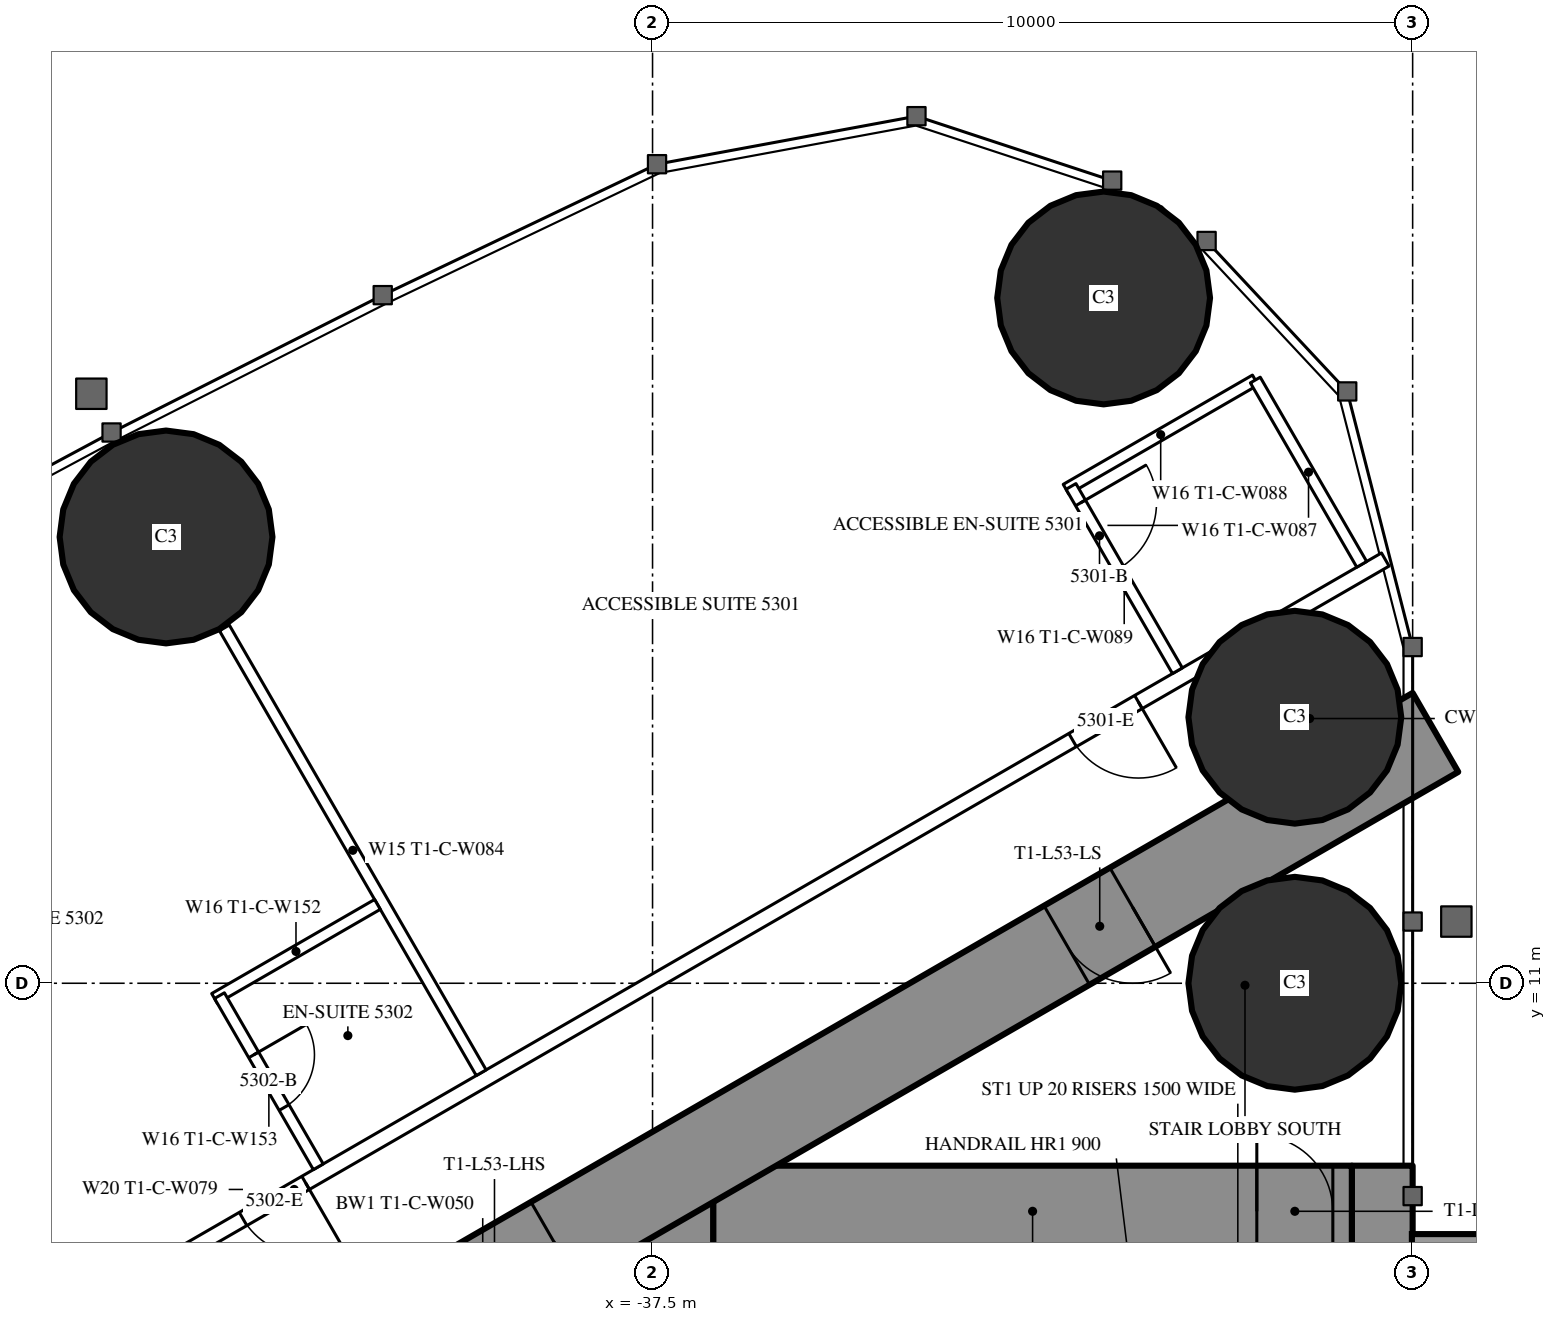
"""IFC4 building model, lengths in metres.
Left out: names, types, materials, properties, quantities, classifications, styles, units other than length and angle.
Written with IfcOpenShell. Run it as: python <this file> out.ifc"""

import sys

from ifc_helpers import new_model, si_unit, direction, frame, frame_2d, origin, origin_2d, place, context, subcontext, project, spatial, rectangle, circle, extrude, element, fill, save


model = new_model("IFC4")
c1 = context("Model", 3, precision=1e-05, world=origin(), true_north=direction((0.0, 1.0)))
c2 = subcontext(c1, "Body", "Model", "MODEL_VIEW")
j1 = project(units=[si_unit("LENGTHUNIT", "METRE"), si_unit("PLANEANGLEUNIT", "RADIAN")], contexts=[c1])
p1 = place(None, origin())
s1 = spatial("IfcSite", under=j1, at=p1, CompositionType="ELEMENT")
p2 = place(p1, origin())
s2 = spatial("IfcBuilding", under=s1, at=p2, CompositionType="ELEMENT")
p3 = place(p2, frame((0.0, 0.0, 198.3)))
s3 = spatial("IfcBuildingStorey", under=s2, at=p3, CompositionType="ELEMENT", Elevation=198.3)
for number, where, z_axis, x_axis in (
    (1, (-31.565, 20.016, 0.0), (0.0, 0.0, 1.0), (1.0, 0.0, 0.0)),
    (2, (-29.05, 11.0, 0.0), (0.0, 0.0, 1.0), (1.0, 0.0, 0.0)),
    (3, (-29.05, 14.5, 0.0), (0.0, 0.0, 1.0), (1.0, 0.0, 0.0)),
    (4, (-43.9, 16.871, 0.0), (0.0, 0.0, 1.0), (1.0, 0.0, 0.0)),
):
    element("IfcColumn", number, at=place(p3, frame(where, z_axis=z_axis, x_axis=x_axis)), inside=s3, PredefinedType="COLUMN", context=c2, shape_type="SweptSolid", body=[
        extrude(circle(Radius=1.4, at=origin_2d()), origin(), (0.0, 0.0, 1.0), 3.5),
    ])
p4 = place(p3, frame((-27.9, 8.6, 0.0), z_axis=(0.0, 0.0, 1.0), x_axis=(0.0, -1.0, 0.0)))
e5 = element("IfcWall", 5, at=p4, inside=s3, PredefinedType="SHEAR", context=c2, shape_type="SweptSolid", body=[
    extrude(rectangle(XDim=17.2, YDim=0.8, at=frame_2d((8.6, 0.0))), origin(), (0.0, 0.0, 1.0), 3.5),
])
p5 = place(p4, frame((2.45, 0.0, 0.6)))
e6 = element("IfcOpeningElement", 6, at=p5, cuts=e5, PredefinedType="OPENING", context=c2, shape_type="SweptSolid", body=[
    extrude(rectangle(XDim=0.6, YDim=2.1, at=frame_2d((0.3, 1.05))), frame((0.0, 0.41, 0.0), z_axis=(0.0, -1.0, 0.0), x_axis=(1.0, 0.0, 0.0)), (0.0, 0.0, 1.0), 0.82),
])
p6 = place(p4, frame((14.15, 0.0, 0.6)))
e7 = element("IfcOpeningElement", 7, at=p6, cuts=e5, PredefinedType="OPENING", context=c2, shape_type="SweptSolid", body=[
    extrude(rectangle(XDim=0.6, YDim=2.1, at=frame_2d((0.3, 1.05))), frame((0.0, 0.41, 0.0), z_axis=(0.0, -1.0, 0.0), x_axis=(1.0, 0.0, 0.0)), (0.0, 0.0, 1.0), 0.82),
])
p7 = place(p3, frame((-37.3, 8.6, 0.0), z_axis=(0.0, 0.0, 1.0), x_axis=(0.0, -1.0, 0.0)))
e8 = element("IfcWall", 8, at=p7, inside=s3, PredefinedType="SHEAR", context=c2, shape_type="SweptSolid", body=[
    extrude(rectangle(XDim=17.2, YDim=1.2, at=frame_2d((8.6, 0.0))), origin(), (0.0, 0.0, 1.0), 3.5),
])
p8 = place(p7, frame((7.7, 0.0, 0.0)))
e9 = element("IfcOpeningElement", 9, at=p8, cuts=e8, PredefinedType="OPENING", context=c2, shape_type="SweptSolid", body=[
    extrude(rectangle(XDim=1.8, YDim=2.2, at=frame_2d((0.9, 1.1))), frame((0.0, 0.61, 0.0), z_axis=(0.0, -1.0, 0.0), x_axis=(1.0, 0.0, 0.0)), (0.0, 0.0, 1.0), 1.22),
])
p9 = place(p3, frame((-28.3, 8.0, 0.0), z_axis=(0.0, 0.0, 1.0), x_axis=(-1.0, 0.0, 0.0)))
e10 = element("IfcWall", 10, at=p9, inside=s3, PredefinedType="SHEAR", context=c2, shape_type="SweptSolid", body=[
    extrude(rectangle(XDim=8.4, YDim=1.2, at=frame_2d((4.2, 0.0))), origin(), (0.0, 0.0, 1.0), 3.5),
])
p10 = place(p9, frame((0.25, 0.0, 0.0)))
e11 = element("IfcOpeningElement", 11, at=p10, cuts=e10, PredefinedType="OPENING", context=c2, shape_type="SweptSolid", body=[
    extrude(rectangle(XDim=1.0, YDim=2.2, at=frame_2d((0.5, 1.1))), frame((0.0, 0.61, 0.0), z_axis=(0.0, -1.0, 0.0), x_axis=(1.0, 0.0, 0.0)), (0.0, 0.0, 1.0), 1.22),
])
p11 = place(p3, frame((-27.2, 14.3, 0.0), z_axis=(0.0, 0.0, 1.0), x_axis=(-0.866026593062, -0.499997940104, 0.0)))
e12 = element("IfcWall", 12, at=p11, inside=s3, PredefinedType="SHEAR", context=c2, shape_type="SweptSolid", body=[
    extrude(rectangle(XDim=28.946, YDim=1.2, at=frame_2d((14.473, 0.0))), origin(), (0.0, 0.0, 1.0), 3.5),
])
p12 = place(p11, frame((4.6, 0.0, 0.0)))
e13 = element("IfcOpeningElement", 13, at=p12, cuts=e12, PredefinedType="OPENING", context=c2, shape_type="SweptSolid", body=[
    extrude(rectangle(XDim=1.0, YDim=2.2, at=frame_2d((0.5, 1.1))), frame((0.0, 0.61, 0.0), z_axis=(0.0, -1.0, 0.0), x_axis=(1.0, 0.0, 0.0)), (0.0, 0.0, 1.0), 1.22),
])
p13 = place(p11, frame((13.395, 0.0, 0.0)))
e14 = element("IfcOpeningElement", 14, at=p13, cuts=e12, PredefinedType="OPENING", context=c2, shape_type="SweptSolid", body=[
    extrude(rectangle(XDim=1.8, YDim=2.2, at=frame_2d((0.9, 1.1))), frame((0.0, 0.61, 0.0), z_axis=(0.0, -1.0, 0.0), x_axis=(1.0, 0.0, 0.0)), (0.0, 0.0, 1.0), 1.22),
])
p14 = place(p3, frame((-27.86, 16.575, 0.0), z_axis=(0.0, 0.0, 1.0), x_axis=(-0.866025533911, -0.499999774615, 0.0)))
e15 = element("IfcWall", 15, at=p14, inside=s3, PredefinedType="PARTITIONING", context=c2, shape_type="SweptSolid", body=[
    extrude(rectangle(XDim=33.149, YDim=0.2, at=frame_2d((16.575, 0.0))), origin(), (0.0, 0.0, 1.0), 3.25),
])
p15 = place(p14, frame((3.75, 0.0, 0.0)))
e16 = element("IfcOpeningElement", 16, at=p15, cuts=e15, PredefinedType="OPENING", context=c2, shape_type="SweptSolid", body=[
    extrude(rectangle(XDim=1.0, YDim=2.2, at=frame_2d((0.5, 1.1))), frame((0.0, 0.11, 0.0), z_axis=(0.0, -1.0, 0.0), x_axis=(1.0, 0.0, 0.0)), (0.0, 0.0, 1.0), 0.22),
])
p16 = place(p14, frame((16.402, 0.0, 0.0)))
e17 = element("IfcOpeningElement", 17, at=p16, cuts=e15, PredefinedType="OPENING", context=c2, shape_type="SweptSolid", body=[
    extrude(rectangle(XDim=0.95, YDim=2.2, at=frame_2d((0.475, 1.1))), frame((0.0, 0.11, 0.0), z_axis=(0.0, -1.0, 0.0), x_axis=(1.0, 0.0, 0.0)), (0.0, 0.0, 1.0), 0.22),
])
p17 = place(p14, frame((22.047, 0.0, 0.0)))
e18 = element("IfcOpeningElement", 18, at=p17, cuts=e15, PredefinedType="OPENING", context=c2, shape_type="SweptSolid", body=[
    extrude(rectangle(XDim=0.95, YDim=2.2, at=frame_2d((0.475, 1.1))), frame((0.0, 0.11, 0.0), z_axis=(0.0, -1.0, 0.0), x_axis=(1.0, 0.0, 0.0)), (0.0, 0.0, 1.0), 0.22),
])
p18 = place(p14, frame((30.396, 0.0, 0.0)))
e19 = element("IfcOpeningElement", 19, at=p18, cuts=e15, PredefinedType="OPENING", context=c2, shape_type="SweptSolid", body=[
    extrude(rectangle(XDim=1.8, YDim=2.2, at=frame_2d((0.9, 1.1))), frame((0.0, 0.11, 0.0), z_axis=(0.0, -1.0, 0.0), x_axis=(1.0, 0.0, 0.0)), (0.0, 0.0, 1.0), 0.22),
])
p19 = place(p3, frame((-39.754, 9.823, 0.0), z_axis=(0.0, 0.0, 1.0), x_axis=(-0.499997670926, 0.866026748472, 0.0)))
e20 = element("IfcWall", 20, at=p19, inside=s3, PredefinedType="PARTITIONING", context=c2, shape_type="SweptSolid", body=[
    extrude(rectangle(XDim=6.757, YDim=0.15, at=frame_2d((3.379, 0.0))), origin(), (0.0, 0.0, 1.0), 2.3),
])
p20 = place(p3, frame((-29.57, 18.936, 0.0), z_axis=(0.0, 0.0, 1.0), x_axis=(-0.866018712932, -0.500011588718, 0.0)))
e21 = element("IfcWall", 21, at=p20, inside=s3, PredefinedType="PARTITIONING", context=c2, shape_type="SweptSolid", body=[
    extrude(rectangle(XDim=2.875, YDim=0.15, at=frame_2d((1.438, 0.0))), origin(), (0.0, 0.0, 1.0), 3.25),
])
p21 = place(p3, frame((-30.595, 15.111, 0.0), z_axis=(0.0, 0.0, 1.0), x_axis=(-0.49998411664, 0.866034573852, 0.0)))
e22 = element("IfcWall", 22, at=p21, inside=s3, PredefinedType="PARTITIONING", context=c2, shape_type="SweptSolid", body=[
    extrude(rectangle(XDim=2.8, YDim=0.15, at=frame_2d((1.4, 0.0))), origin(), (0.0, 0.0, 1.0), 3.25),
])
p22 = place(p21, frame((1.55, 0.0, 0.0)))
e23 = element("IfcOpeningElement", 23, at=p22, cuts=e22, PredefinedType="OPENING", context=c2, shape_type="SweptSolid", body=[
    extrude(rectangle(XDim=1.0, YDim=2.2, at=frame_2d((0.5, 1.1))), frame((0.0, 0.085, 0.0), z_axis=(0.0, -1.0, 0.0), x_axis=(1.0, 0.0, 0.0)), (0.0, 0.0, 1.0), 0.17),
])
p23 = place(p3, frame((-28.17, 16.511, 0.0), z_axis=(0.0, 0.0, 1.0), x_axis=(-0.49994636267, 0.866056369097, 0.0)))
e24 = element("IfcWall", 24, at=p23, inside=s3, PredefinedType="PARTITIONING", context=c2, shape_type="SweptSolid", body=[
    extrude(rectangle(XDim=2.8, YDim=0.15, at=frame_2d((1.4, 0.0))), origin(), (0.0, 0.0, 1.0), 3.25),
])
p24 = place(p3, frame((-41.119, 12.037, 0.0), z_axis=(0.0, 0.0, 1.0), x_axis=(-0.866073894602, -0.499916002032, 0.0)))
e25 = element("IfcWall", 25, at=p24, inside=s3, PredefinedType="PARTITIONING", context=c2, shape_type="SweptSolid", body=[
    extrude(rectangle(XDim=2.475, YDim=0.15, at=frame_2d((1.238, 0.0))), origin(), (0.0, 0.0, 1.0), 3.25),
])
p25 = place(p3, frame((-41.898, 8.585, 0.0), z_axis=(0.0, 0.0, 1.0), x_axis=(-0.500006934395, 0.866021400173, 0.0)))
e26 = element("IfcWall", 26, at=p25, inside=s3, PredefinedType="PARTITIONING", context=c2, shape_type="SweptSolid", body=[
    extrude(rectangle(XDim=2.6, YDim=0.15, at=frame_2d((1.3, 0.0))), origin(), (0.0, 0.0, 1.0), 3.25),
])
p26 = place(p25, frame((0.9, 0.0, 0.0)))
e27 = element("IfcOpeningElement", 27, at=p26, cuts=e26, PredefinedType="OPENING", context=c2, shape_type="SweptSolid", body=[
    extrude(rectangle(XDim=0.8, YDim=2.2, at=frame_2d((0.4, 1.1))), frame((0.0, 0.085, 0.0), z_axis=(0.0, -1.0, 0.0), x_axis=(1.0, 0.0, 0.0)), (0.0, 0.0, 1.0), 0.17),
])
p27 = place(p22, origin())
e28 = element("IfcDoor", 28, at=p27, inside=s3, OperationType="SINGLE_SWING_RIGHT", PredefinedType="DOOR", context=c2, shape_type="SweptSolid", body=[
    extrude(rectangle(XDim=1.0, YDim=2.2, at=frame_2d((0.5, 1.1))), frame((0.0, 0.025, 0.0), z_axis=(0.0, -1.0, 0.0), x_axis=(1.0, 0.0, 0.0)), (0.0, 0.0, 1.0), 0.05),
])
fill(e23, e28)
p28 = place(p15, origin())
e29 = element("IfcDoor", 29, at=p28, inside=s3, OperationType="SINGLE_SWING_LEFT", PredefinedType="DOOR", context=c2, shape_type="SweptSolid", body=[
    extrude(rectangle(XDim=1.0, YDim=2.2, at=frame_2d((0.5, 1.1))), frame((0.0, 0.025, 0.0), z_axis=(0.0, -1.0, 0.0), x_axis=(1.0, 0.0, 0.0)), (0.0, 0.0, 1.0), 0.05),
])
fill(e16, e29)
p29 = place(p26, origin())
e30 = element("IfcDoor", 30, at=p29, inside=s3, OperationType="SINGLE_SWING_RIGHT", PredefinedType="DOOR", context=c2, shape_type="SweptSolid", body=[
    extrude(rectangle(XDim=0.8, YDim=2.2, at=frame_2d((0.4, 1.1))), frame((0.0, 0.025, 0.0), z_axis=(0.0, -1.0, 0.0), x_axis=(1.0, 0.0, 0.0)), (0.0, 0.0, 1.0), 0.05),
])
fill(e27, e30)
p30 = place(p16, origin())
e31 = element("IfcDoor", 31, at=p30, inside=s3, OperationType="SINGLE_SWING_LEFT", PredefinedType="DOOR", context=c2, shape_type="SweptSolid", body=[
    extrude(rectangle(XDim=0.95, YDim=2.2, at=frame_2d((0.475, 1.1))), frame((0.0, 0.025, 0.0), z_axis=(0.0, -1.0, 0.0), x_axis=(1.0, 0.0, 0.0)), (0.0, 0.0, 1.0), 0.05),
])
fill(e17, e31)
p31 = place(p12, origin())
e32 = element("IfcDoor", 32, at=p31, inside=s3, OperationType="SINGLE_SWING_LEFT", PredefinedType="DOOR", context=c2, shape_type="SweptSolid", body=[
    extrude(rectangle(XDim=1.0, YDim=2.2, at=frame_2d((0.5, 1.1))), frame((0.0, 0.025, 0.0), z_axis=(0.0, -1.0, 0.0), x_axis=(1.0, 0.0, 0.0)), (0.0, 0.0, 1.0), 0.05),
])
fill(e13, e32)
p32 = place(p13, origin())
e33 = element("IfcDoor", 33, at=p32, inside=s3, OperationType="DOUBLE_DOOR_SINGLE_SWING", PredefinedType="DOOR", context=c2, shape_type="SweptSolid", body=[
    extrude(rectangle(XDim=1.8, YDim=2.2, at=frame_2d((0.9, 1.1))), frame((0.0, 0.025, 0.0), z_axis=(0.0, -1.0, 0.0), x_axis=(1.0, 0.0, 0.0)), (0.0, 0.0, 1.0), 0.05),
])
fill(e14, e33)
p33 = place(p10, origin())
e34 = element("IfcDoor", 34, at=p33, inside=s3, OperationType="SINGLE_SWING_RIGHT", PredefinedType="DOOR", context=c2, shape_type="SweptSolid", body=[
    extrude(rectangle(XDim=1.0, YDim=2.2, at=frame_2d((0.5, 1.1))), frame((0.0, 0.025, 0.0), z_axis=(0.0, -1.0, 0.0), x_axis=(1.0, 0.0, 0.0)), (0.0, 0.0, 1.0), 0.05),
])
fill(e11, e34)
save(model, sys.argv[1])
